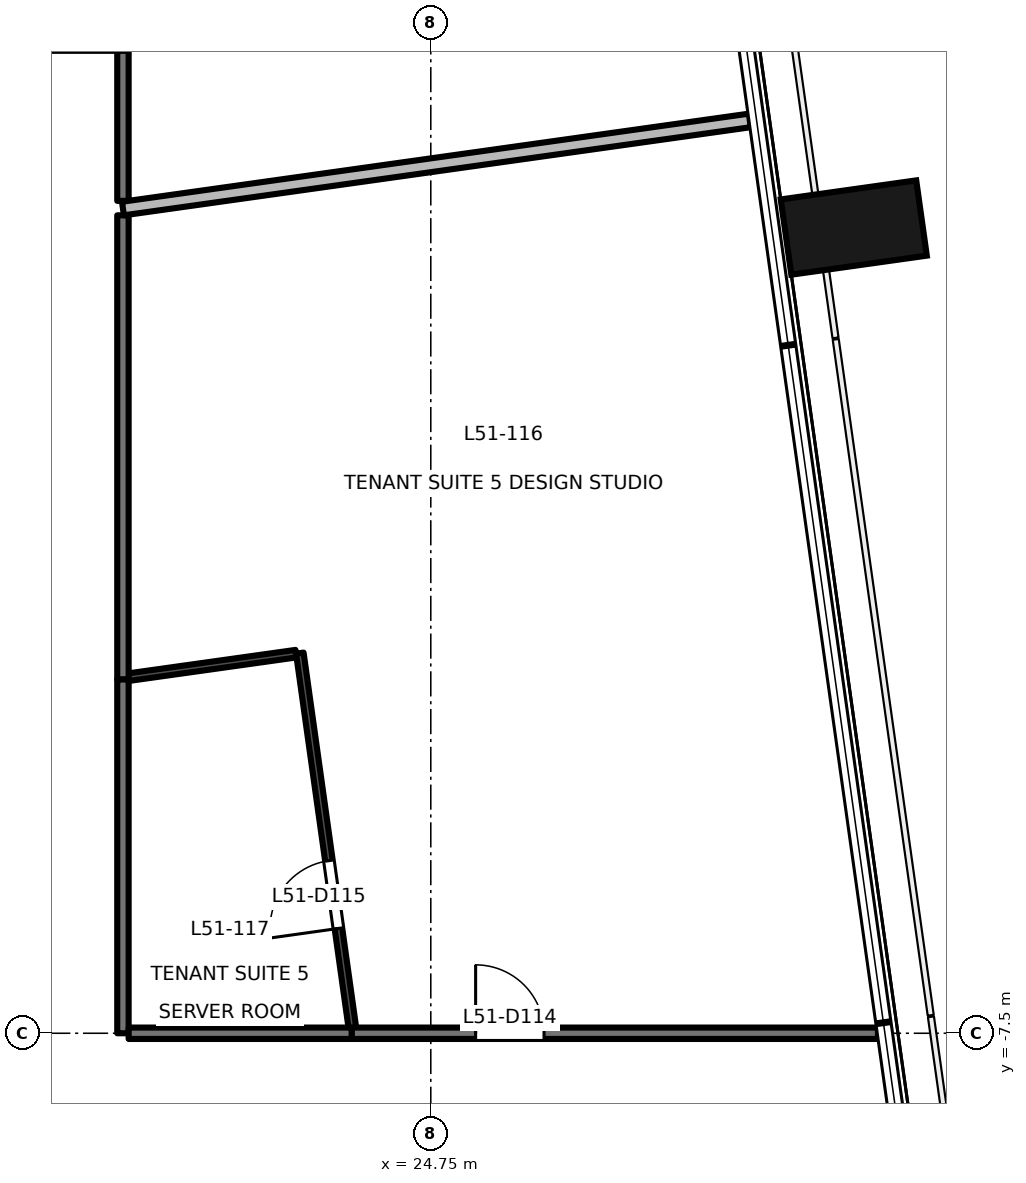
"""IFC4 building model, lengths in metres.
Left out: names, types, materials, properties, quantities, classifications, styles, units other than length and angle.
Written with IfcOpenShell. Run it as: python <this file> out.ifc"""

import sys

from ifc_helpers import new_model, si_unit, direction, frame, frame_2d, origin, origin_2d, place, context, subcontext, project, spatial, rectangle, extrude, element, fill, save


model = new_model("IFC4")
c1 = context("Model", 3, precision=1e-05, world=origin(), true_north=direction((0.0, 1.0)))
c2 = subcontext(c1, "Body", "Model", "MODEL_VIEW")
j1 = project(units=[si_unit("LENGTHUNIT", "METRE"), si_unit("PLANEANGLEUNIT", "RADIAN")], contexts=[c1])
p1 = place(None, origin())
s1 = spatial("IfcSite", under=j1, at=p1, CompositionType="ELEMENT")
p2 = place(p1, origin())
s2 = spatial("IfcBuilding", under=s1, at=p2, CompositionType="ELEMENT")
p3 = place(p2, frame((0.0, 0.0, 225.2)))
s3 = spatial("IfcBuildingStorey", under=s2, at=p3, CompositionType="ELEMENT", Elevation=225.2)
p4 = place(p3, frame((30.315, 3.1, -0.2), z_axis=(0.0, 0.0, 1.0), x_axis=(-0.139190384377, 0.990265639562, 0.0)))
e1 = element("IfcColumn", 1, at=p4, inside=s3, PredefinedType="COLUMN", context=c2, shape_type="SweptSolid", body=[
    extrude(rectangle(XDim=1.0, YDim=1.8, at=origin_2d()), origin(), (0.0, 0.0, 1.0), 3.9),
])
p5 = place(p3, frame((20.7, 3.261, 0.0), z_axis=(0.0, 0.0, 1.0), x_axis=(0.0, -1.0, 0.0)))
e2 = element("IfcWall", 2, at=p5, inside=s3, PredefinedType="PARTITIONING", context=c2, shape_type="SweptSolid", body=[
    extrude(rectangle(XDim=6.107, YDim=0.15, at=frame_2d((3.053, 0.0))), origin(), (0.0, 0.0, 1.0), 3.15),
])
p6 = place(p3, frame((23.709, -7.5, 0.0), z_axis=(0.0, 0.0, 1.0), x_axis=(1.0, 0.0, 0.0)))
e3 = element("IfcWall", 3, at=p6, inside=s3, PredefinedType="PARTITIONING", context=c2, shape_type="SweptSolid", body=[
    extrude(rectangle(XDim=6.924, YDim=0.15, at=frame_2d((3.462, 0.0))), origin(), (0.0, 0.0, 1.0), 3.7),
])
p7 = place(p6, frame((1.631, 0.0, 0.0)))
e4 = element("IfcOpeningElement", 4, at=p7, cuts=e3, PredefinedType="OPENING", context=c2, shape_type="SweptSolid", body=[
    extrude(rectangle(XDim=0.9, YDim=2.1, at=frame_2d((0.45, 1.05))), frame((0.0, 0.085, 0.0), z_axis=(0.0, -1.0, 0.0), x_axis=(1.0, 0.0, 0.0)), (0.0, 0.0, 1.0), 0.171),
])
p8 = place(p3, frame((20.7, -2.846, 0.0), z_axis=(0.0, 0.0, 1.0), x_axis=(0.0, -1.0, 0.0)))
e5 = element("IfcWall", 5, at=p8, inside=s3, PredefinedType="PARTITIONING", context=c2, shape_type="SweptSolid", body=[
    extrude(rectangle(XDim=4.654, YDim=0.15, at=frame_2d((2.327, 0.0))), origin(), (0.0, 0.0, 1.0), 3.1),
])
p9 = place(p3, frame((20.775, -7.5, 0.0), z_axis=(0.0, 0.0, 1.0), x_axis=(1.0, 0.0, 0.0)))
e6 = element("IfcWall", 6, at=p9, inside=s3, PredefinedType="PARTITIONING", context=c2, shape_type="SweptSolid", body=[
    extrude(rectangle(XDim=2.934, YDim=0.15, at=frame_2d((1.467, 0.0))), origin(), (0.0, 0.0, 1.0), 3.7),
])
p10 = place(p3, frame((20.7, 5.425, 0.0), z_axis=(0.0, 0.0, 1.0), x_axis=(0.0, -1.0, 0.0)))
e7 = element("IfcWall", 7, at=p10, inside=s3, PredefinedType="PARTITIONING", context=c2, shape_type="SweptSolid", body=[
    extrude(rectangle(XDim=1.974, YDim=0.15, at=frame_2d((0.987, 0.0))), origin(), (0.0, 0.0, 1.0), 3.15),
])
p11 = place(p3, frame((22.977, -2.506, 0.0), z_axis=(0.0, 0.0, 1.0), x_axis=(-0.990307451449, -0.138892590173, 0.0)))
e8 = element("IfcWall", 8, at=p11, inside=s3, PredefinedType="PARTITIONING", context=c2, shape_type="SweptSolid", body=[
    extrude(rectangle(XDim=2.231, YDim=0.1, at=frame_2d((1.115, 0.0))), origin(), (0.0, 0.0, 1.0), 3.7),
])
p12 = place(p3, frame((23.719, -7.432, 0.0), z_axis=(0.0, 0.0, 1.0), x_axis=(-0.138902614834, 0.990306045418, 0.0)))
e9 = element("IfcWall", 9, at=p12, inside=s3, PredefinedType="PARTITIONING", context=c2, shape_type="SweptSolid", body=[
    extrude(rectangle(XDim=4.981, YDim=0.1, at=frame_2d((2.491, 0.0))), origin(), (0.0, 0.0, 1.0), 3.1),
])
p13 = place(p12, frame((1.324, 0.0, 0.0)))
e10 = element("IfcOpeningElement", 10, at=p13, cuts=e9, PredefinedType="OPENING", context=c2, shape_type="SweptSolid", body=[
    extrude(rectangle(XDim=0.9, YDim=2.1, at=frame_2d((0.45, 1.05))), frame((0.0, 0.061, 0.0), z_axis=(0.0, -1.0, 0.0), x_axis=(1.0, 0.0, 0.0)), (0.0, 0.0, 1.0), 0.121),
])
p14 = place(p3, frame((20.7, 3.35, 0.0), z_axis=(0.0, 0.0, 1.0), x_axis=(0.990269965101, 0.139159606996, 0.0)))
e11 = element("IfcWall", 11, at=p14, inside=s3, PredefinedType="PARTITIONING", context=c2, shape_type="SweptSolid", body=[
    extrude(rectangle(XDim=8.328, YDim=0.18, at=frame_2d((4.164, 0.0))), origin(), (0.0, 0.0, 1.0), 3.15),
])
p15 = place(p7, origin())
e12 = element("IfcDoor", 12, at=p15, inside=s3, OperationType="SINGLE_SWING_LEFT", PredefinedType="DOOR", context=c2, shape_type="SweptSolid", body=[
    extrude(rectangle(XDim=0.9, YDim=2.1, at=frame_2d((0.45, 1.05))), frame((0.0, 0.025, 0.0), z_axis=(0.0, -1.0, 0.0), x_axis=(1.0, 0.0, 0.0)), (0.0, 0.0, 1.0), 0.05),
])
fill(e4, e12)
p16 = place(p13, origin())
e13 = element("IfcDoor", 13, at=p16, inside=s3, OperationType="SINGLE_SWING_LEFT", PredefinedType="DOOR", context=c2, shape_type="SweptSolid", body=[
    extrude(rectangle(XDim=0.9, YDim=2.1, at=frame_2d((0.45, 1.05))), frame((0.0, 0.025, 0.0), z_axis=(0.0, -1.0, 0.0), x_axis=(1.0, 0.0, 0.0)), (0.0, 0.0, 1.0), 0.05),
])
fill(e10, e13)
save(model, sys.argv[1])
